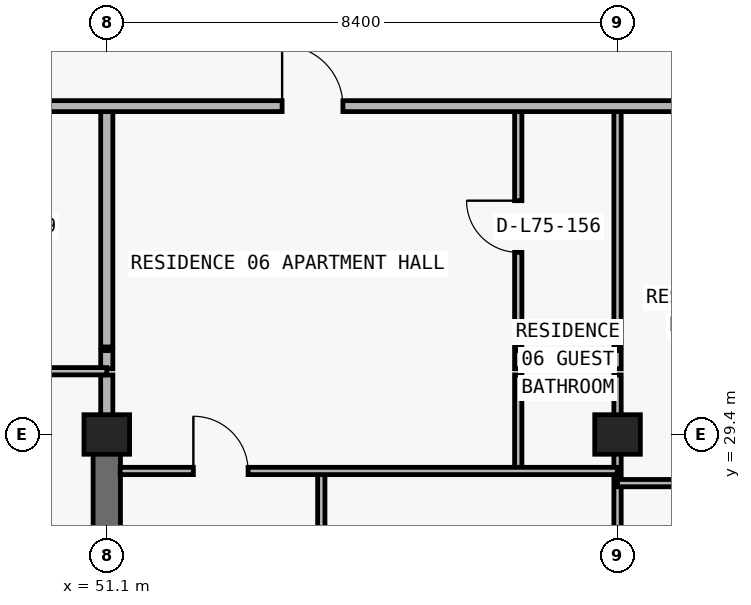
"""IFC4 building model, lengths in metres.
Left out: names, types, materials, properties, quantities, classifications, styles, units other than length and angle.
Written with IfcOpenShell. Run it as: python <this file> out.ifc"""

import sys

from ifc_helpers import new_model, si_unit, direction, frame, frame_2d, origin, origin_2d, place, context, subcontext, project, spatial, rectangle, extrude, element, fill, save


model = new_model("IFC4")
c1 = context("Model", 3, precision=1e-05, world=origin(), true_north=direction((0.0, 1.0)))
c2 = subcontext(c1, "Body", "Model", "MODEL_VIEW")
j1 = project(units=[si_unit("LENGTHUNIT", "METRE"), si_unit("PLANEANGLEUNIT", "RADIAN")], contexts=[c1])
p1 = place(None, origin())
s1 = spatial("IfcSite", under=j1, at=p1, CompositionType="ELEMENT")
p2 = place(p1, origin())
s2 = spatial("IfcBuilding", under=s1, at=p2, CompositionType="ELEMENT")
p3 = place(p2, frame((0.0, 0.0, 266.1)))
s3 = spatial("IfcBuildingStorey", under=s2, at=p3, CompositionType="ELEMENT", Elevation=266.1)
for number, where, z_axis, x_axis in (
    (1, (51.1, 29.4, 0.0), (0.0, 0.0, 1.0), (1.0, 0.0, 0.0)),
    (2, (59.5, 29.4, 0.0), (0.0, 0.0, 1.0), (1.0, 0.0, 0.0)),
):
    element("IfcColumn", number, at=place(p3, frame(where, z_axis=z_axis, x_axis=x_axis)), inside=s3, PredefinedType="COLUMN", context=c2, shape_type="SweptSolid", body=[
        extrude(rectangle(XDim=0.75, YDim=0.65, at=origin_2d()), origin(), (0.0, 0.0, 1.0), 3.0),
    ])
p4 = place(p3, frame((51.1, 20.8, 0.0), z_axis=(0.0, 0.0, 1.0), x_axis=(0.0, 1.0, 0.0)))
e3 = element("IfcWall", 3, at=p4, inside=s3, PredefinedType="SHEAR", context=c2, shape_type="SweptSolid", body=[
    extrude(rectangle(XDim=8.6, YDim=0.45, at=frame_2d((4.3, 0.0))), origin(), (0.0, 0.0, 1.0), 3.0),
])
p5 = place(p3, frame((51.1, 29.405, 0.0), z_axis=(0.0, 0.0, 1.0), x_axis=(0.0, 1.0, 0.0)))
e4 = element("IfcWall", 4, at=p5, inside=s3, PredefinedType="PARTITIONING", context=c2, shape_type="SweptSolid", body=[
    extrude(rectangle(XDim=0.975, YDim=0.2, at=frame_2d((0.487, 0.0))), origin(), (0.0, 0.0, 1.0), 2.285),
])
p6 = place(p3, frame((51.1, 30.48, 0.0), z_axis=(0.0, 0.0, 1.0), x_axis=(0.0, 1.0, 0.0)))
e5 = element("IfcWall", 5, at=p6, inside=s3, PredefinedType="PARTITIONING", context=c2, shape_type="SweptSolid", body=[
    extrude(rectangle(XDim=0.3, YDim=0.2, at=frame_2d((0.15, 0.0))), origin(), (0.0, 0.0, 1.0), 2.285),
])
p7 = place(p3, frame((51.1, 30.84, 0.0), z_axis=(0.0, 0.0, 1.0), x_axis=(0.0, 1.0, 0.0)))
e6 = element("IfcWall", 6, at=p7, inside=s3, PredefinedType="PARTITIONING", context=c2, shape_type="SweptSolid", body=[
    extrude(rectangle(XDim=3.96, YDim=0.2, at=frame_2d((1.98, 0.0))), origin(), (0.0, 0.0, 1.0), 2.285),
])
p8 = place(p3, frame((54.628, 25.69, 0.0), z_axis=(0.0, 0.0, 1.0), x_axis=(0.0, 1.0, 0.0)))
e7 = element("IfcWall", 7, at=p8, inside=s3, PredefinedType="PARTITIONING", context=c2, shape_type="SweptSolid", body=[
    extrude(rectangle(XDim=3.11, YDim=0.12, at=frame_2d((1.555, 0.0))), origin(), (0.0, 0.0, 1.0), 3.0),
])
p9 = place(p8, frame((1.105, 0.0, 0.0)))
e8 = element("IfcOpeningElement", 8, at=p9, cuts=e7, PredefinedType="OPENING", context=c2, shape_type="SweptSolid", body=[
    extrude(rectangle(XDim=0.9, YDim=2.15, at=frame_2d((0.45, 1.075))), frame((0.0, 0.07, 0.0), z_axis=(0.0, -1.0, 0.0), x_axis=(1.0, 0.0, 0.0)), (0.0, 0.0, 1.0), 0.14),
])
p10 = place(p3, frame((57.867, 28.8, 0.0), z_axis=(0.0, 0.0, 1.0), x_axis=(0.0, 1.0, 0.0)))
e9 = element("IfcWall", 9, at=p10, inside=s3, PredefinedType="PARTITIONING", context=c2, shape_type="SweptSolid", body=[
    extrude(rectangle(XDim=1.58, YDim=0.12, at=frame_2d((0.79, 0.0))), origin(), (0.0, 0.0, 1.0), 3.0),
])
p11 = place(p3, frame((57.867, 30.48, 0.0), z_axis=(0.0, 0.0, 1.0), x_axis=(0.0, 1.0, 0.0)))
e10 = element("IfcWall", 10, at=p11, inside=s3, PredefinedType="PARTITIONING", context=c2, shape_type="SweptSolid", body=[
    extrude(rectangle(XDim=0.3, YDim=0.12, at=frame_2d((0.15, 0.0))), origin(), (0.0, 0.0, 1.0), 3.0),
])
p12 = place(p3, frame((57.867, 30.84, 0.0), z_axis=(0.0, 0.0, 1.0), x_axis=(0.0, 1.0, 0.0)))
e11 = element("IfcWall", 11, at=p12, inside=s3, PredefinedType="PARTITIONING", context=c2, shape_type="SweptSolid", body=[
    extrude(rectangle(XDim=3.96, YDim=0.12, at=frame_2d((1.98, 0.0))), origin(), (0.0, 0.0, 1.0), 3.0),
])
p13 = place(p12, frame((1.555, 0.0, 0.0)))
e12 = element("IfcOpeningElement", 12, at=p13, cuts=e11, PredefinedType="OPENING", context=c2, shape_type="SweptSolid", body=[
    extrude(rectangle(XDim=0.85, YDim=2.1, at=frame_2d((0.425, 1.05))), frame((0.0, 0.07, 0.0), z_axis=(0.0, -1.0, 0.0), x_axis=(1.0, 0.0, 0.0)), (0.0, 0.0, 1.0), 0.14),
])
p14 = place(p3, frame((59.5, 25.69, 0.0), z_axis=(0.0, 0.0, 1.0), x_axis=(0.0, 1.0, 0.0)))
e13 = element("IfcWall", 13, at=p14, inside=s3, PredefinedType="PARTITIONING", context=c2, shape_type="SweptSolid", body=[
    extrude(rectangle(XDim=4.69, YDim=0.12, at=frame_2d((2.345, 0.0))), origin(), (0.0, 0.0, 1.0), 2.213),
])
p15 = place(p14, frame((1.005, 0.0, 0.0)))
e14 = element("IfcOpeningElement", 14, at=p15, cuts=e13, PredefinedType="OPENING", context=c2, shape_type="SweptSolid", body=[
    extrude(rectangle(XDim=0.9, YDim=2.15, at=frame_2d((0.45, 1.075))), frame((0.0, 0.07, 0.0), z_axis=(0.0, -1.0, 0.0), x_axis=(1.0, 0.0, 0.0)), (0.0, 0.0, 1.0), 0.14),
])
p16 = place(p3, frame((59.5, 30.48, 0.0), z_axis=(0.0, 0.0, 1.0), x_axis=(0.0, 1.0, 0.0)))
e15 = element("IfcWall", 15, at=p16, inside=s3, PredefinedType="PARTITIONING", context=c2, shape_type="SweptSolid", body=[
    extrude(rectangle(XDim=0.3, YDim=0.12, at=frame_2d((0.15, 0.0))), origin(), (0.0, 0.0, 1.0), 2.213),
])
p17 = place(p3, frame((59.5, 30.84, 0.0), z_axis=(0.0, 0.0, 1.0), x_axis=(0.0, 1.0, 0.0)))
e16 = element("IfcWall", 16, at=p17, inside=s3, PredefinedType="PARTITIONING", context=c2, shape_type="SweptSolid", body=[
    extrude(rectangle(XDim=3.96, YDim=0.12, at=frame_2d((1.98, 0.0))), origin(), (0.0, 0.0, 1.0), 2.213),
])
p18 = place(p3, frame((59.5, 28.6, 0.0), z_axis=(0.0, 0.0, 1.0), x_axis=(1.0, 0.0, 0.0)))
e17 = element("IfcWall", 17, at=p18, inside=s3, PredefinedType="PARTITIONING", context=c2, shape_type="SweptSolid", body=[
    extrude(rectangle(XDim=6.2, YDim=0.12, at=frame_2d((3.1, 0.0))), origin(), (0.0, 0.0, 1.0), 3.0),
])
p19 = place(p18, frame((1.835, 0.0, 0.0)))
e18 = element("IfcOpeningElement", 18, at=p19, cuts=e17, PredefinedType="OPENING", context=c2, shape_type="SweptSolid", body=[
    extrude(rectangle(XDim=0.9, YDim=2.15, at=frame_2d((0.45, 1.075))), frame((0.0, 0.07, 0.0), z_axis=(0.0, -1.0, 0.0), x_axis=(1.0, 0.0, 0.0)), (0.0, 0.0, 1.0), 0.14),
])
p20 = place(p3, frame((51.32, 28.8, 0.0), z_axis=(0.0, 0.0, 1.0), x_axis=(1.0, 0.0, 0.0)))
e19 = element("IfcWall", 19, at=p20, inside=s3, PredefinedType="PARTITIONING", context=c2, shape_type="SweptSolid", body=[
    extrude(rectangle(XDim=8.175, YDim=0.12, at=frame_2d((4.087, 0.0))), origin(), (0.0, 0.0, 1.0), 3.0),
])
p21 = place(p20, frame((1.204, 0.0, 0.0)))
e20 = element("IfcOpeningElement", 20, at=p21, cuts=e19, PredefinedType="OPENING", context=c2, shape_type="SweptSolid", body=[
    extrude(rectangle(XDim=0.9, YDim=2.15, at=frame_2d((0.45, 1.075))), frame((0.0, 0.07, 0.0), z_axis=(0.0, -1.0, 0.0), x_axis=(1.0, 0.0, 0.0)), (0.0, 0.0, 1.0), 0.14),
])
p22 = place(p3, frame((42.7, 30.44, 0.0), z_axis=(0.0, 0.0, 1.0), x_axis=(1.0, 0.0, 0.0)))
e21 = element("IfcWall", 21, at=p22, inside=s3, PredefinedType="PARTITIONING", context=c2, shape_type="SweptSolid", body=[
    extrude(rectangle(XDim=8.4, YDim=0.12, at=frame_2d((4.2, 0.0))), origin(), (0.0, 0.0, 1.0), 3.0),
])
p23 = place(p22, frame((1.818, 0.0, 0.0)))
e22 = element("IfcOpeningElement", 22, at=p23, cuts=e21, PredefinedType="OPENING", context=c2, shape_type="SweptSolid", body=[
    extrude(rectangle(XDim=0.9, YDim=2.15, at=frame_2d((0.45, 1.075))), frame((0.0, 0.07, 0.0), z_axis=(0.0, -1.0, 0.0), x_axis=(1.0, 0.0, 0.0)), (0.0, 0.0, 1.0), 0.14),
])
p24 = place(p3, frame((31.5, 34.8, 0.0), z_axis=(0.0, 0.0, 1.0), x_axis=(1.0, 0.0, 0.0)))
e23 = element("IfcWall", 23, at=p24, inside=s3, PredefinedType="PARTITIONING", context=c2, shape_type="SweptSolid", body=[
    extrude(rectangle(XDim=34.2, YDim=0.18, at=frame_2d((17.1, 0.0))), origin(), (0.0, 0.0, 1.0), 3.0),
])
p25 = place(p24, frame((5.6, 0.0, 0.0)))
e24 = element("IfcOpeningElement", 24, at=p25, cuts=e23, PredefinedType="OPENING", context=c2, shape_type="SweptSolid", body=[
    extrude(rectangle(XDim=1.0, YDim=2.2, at=frame_2d((0.5, 1.1))), frame((0.0, 0.1, 0.0), z_axis=(0.0, -1.0, 0.0), x_axis=(1.0, 0.0, 0.0)), (0.0, 0.0, 1.0), 0.2),
])
p26 = place(p24, frame((13.799, 0.0, 0.0)))
e25 = element("IfcOpeningElement", 25, at=p26, cuts=e23, PredefinedType="OPENING", context=c2, shape_type="SweptSolid", body=[
    extrude(rectangle(XDim=1.0, YDim=2.2, at=frame_2d((0.5, 1.1))), frame((0.0, 0.1, 0.0), z_axis=(0.0, -1.0, 0.0), x_axis=(1.0, 0.0, 0.0)), (0.0, 0.0, 1.0), 0.2),
])
p27 = place(p24, frame((22.483, 0.0, 0.0)))
e26 = element("IfcOpeningElement", 26, at=p27, cuts=e23, PredefinedType="OPENING", context=c2, shape_type="SweptSolid", body=[
    extrude(rectangle(XDim=1.0, YDim=2.2, at=frame_2d((0.5, 1.1))), frame((0.0, 0.1, 0.0), z_axis=(0.0, -1.0, 0.0), x_axis=(1.0, 0.0, 0.0)), (0.0, 0.0, 1.0), 0.2),
])
p28 = place(p27, origin())
e27 = element("IfcDoor", 27, at=p28, inside=s3, OperationType="SINGLE_SWING_LEFT", PredefinedType="DOOR", context=c2, shape_type="SweptSolid", body=[
    extrude(rectangle(XDim=1.0, YDim=2.2, at=frame_2d((0.5, 1.1))), frame((0.0, 0.025, 0.0), z_axis=(0.0, -1.0, 0.0), x_axis=(1.0, 0.0, 0.0)), (0.0, 0.0, 1.0), 0.05),
])
fill(e26, e27)
p29 = place(p13, origin())
e28 = element("IfcDoor", 28, at=p29, inside=s3, OperationType="SINGLE_SWING_RIGHT", PredefinedType="DOOR", context=c2, shape_type="SweptSolid", body=[
    extrude(rectangle(XDim=0.85, YDim=2.1, at=frame_2d((0.425, 1.05))), frame((0.0, 0.025, 0.0), z_axis=(0.0, -1.0, 0.0), x_axis=(1.0, 0.0, 0.0)), (0.0, 0.0, 1.0), 0.05),
])
fill(e12, e28)
p30 = place(p21, origin())
e29 = element("IfcDoor", 29, at=p30, inside=s3, OperationType="SINGLE_SWING_LEFT", PredefinedType="DOOR", context=c2, shape_type="SweptSolid", body=[
    extrude(rectangle(XDim=0.9, YDim=2.15, at=frame_2d((0.45, 1.075))), frame((0.0, 0.025, 0.0), z_axis=(0.0, -1.0, 0.0), x_axis=(1.0, 0.0, 0.0)), (0.0, 0.0, 1.0), 0.05),
])
fill(e20, e29)
save(model, sys.argv[1])
